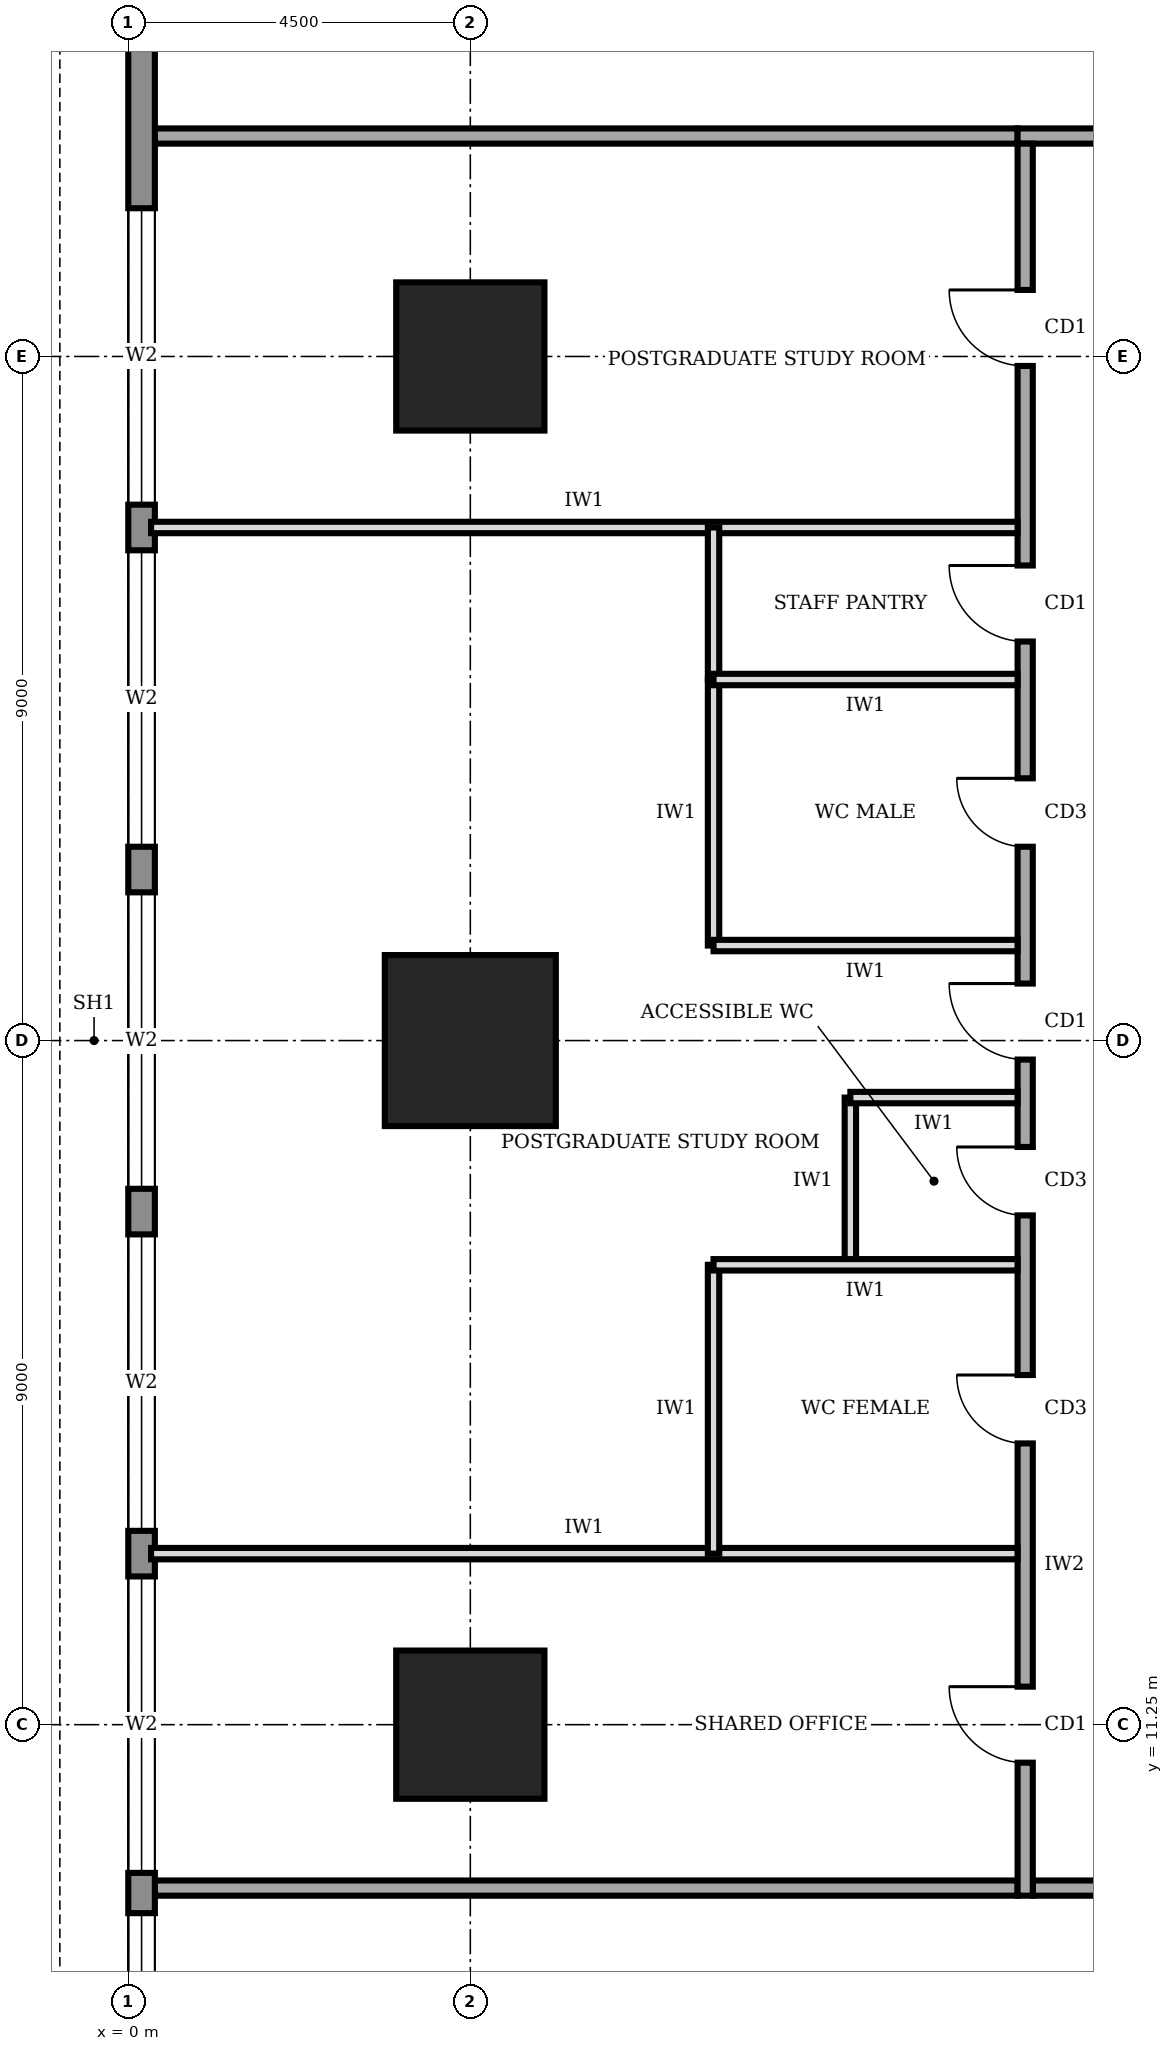
"""IFC4 building model, lengths in metres.
Left out: names, types, materials, properties, quantities, classifications, styles, units other than length and angle.
Written with IfcOpenShell. Run it as: python <this file> out.ifc"""

import sys

from ifc_helpers import new_model, si_unit, direction, frame, frame_2d, origin, origin_2d, place, context, subcontext, project, spatial, rectangle, extrude, element, fill, save


model = new_model("IFC4")
c1 = context("Model", 3, precision=1e-05, world=origin(), true_north=direction((0.0, 1.0)))
c2 = subcontext(c1, "Body", "Model", "MODEL_VIEW")
j1 = project(units=[si_unit("LENGTHUNIT", "METRE"), si_unit("PLANEANGLEUNIT", "RADIAN")], contexts=[c1])
p1 = place(None, origin())
s1 = spatial("IfcSite", under=j1, at=p1, CompositionType="ELEMENT")
p2 = place(p1, origin())
s2 = spatial("IfcBuilding", under=s1, at=p2, CompositionType="ELEMENT")
p3 = place(p2, frame((0.0, 0.0, 233.0)))
s3 = spatial("IfcBuildingStorey", under=s2, at=p3, CompositionType="ELEMENT", Elevation=233.0)
p4 = place(p3, frame((4.5, 11.25, 0.0), z_axis=(0.0, 0.0, 1.0), x_axis=(1.0, 0.0, 0.0)))
e1 = element("IfcColumn", 1, at=p4, inside=s3, PredefinedType="COLUMN", context=c2, shape_type="SweptSolid", body=[
    extrude(rectangle(XDim=1.95, YDim=1.95, at=origin_2d()), origin(), (0.0, 0.0, 1.0), 4.0),
])
p5 = place(p3, frame((4.5, 20.25, 0.0), z_axis=(0.0, 0.0, 1.0), x_axis=(1.0, 0.0, 0.0)))
e2 = element("IfcColumn", 2, at=p5, inside=s3, PredefinedType="COLUMN", context=c2, shape_type="SweptSolid", body=[
    extrude(rectangle(XDim=2.25, YDim=2.25, at=origin_2d()), origin(), (0.0, 0.0, 1.0), 4.0),
])
p6 = place(p3, frame((4.5, 29.25, 0.0), z_axis=(0.0, 0.0, 1.0), x_axis=(1.0, 0.0, 0.0)))
e3 = element("IfcColumn", 3, at=p6, inside=s3, PredefinedType="COLUMN", context=c2, shape_type="SweptSolid", body=[
    extrude(rectangle(XDim=1.95, YDim=1.95, at=origin_2d()), origin(), (0.0, 0.0, 1.0), 4.0),
])
p7 = place(p3, frame((0.175, 35.98, 0.0), z_axis=(0.0, 0.0, 1.0), x_axis=(0.0, -1.0, 0.0)))
e4 = element("IfcWall", 4, at=p7, inside=s3, PredefinedType="STANDARD", context=c2, shape_type="SweptSolid", body=[
    extrude(rectangle(XDim=31.46, YDim=0.35, at=frame_2d((15.73, 0.0))), origin(), (0.0, 0.0, 1.0), 3.75),
])
p8 = place(p7, frame((27.21, 0.0, 0.6)))
e5 = element("IfcOpeningElement", 5, at=p8, cuts=e4, PredefinedType="OPENING", context=c2, shape_type="SweptSolid", body=[
    extrude(rectangle(XDim=3.9, YDim=2.6, at=frame_2d((1.95, 1.3))), frame((0.0, 0.185, 0.0), z_axis=(0.0, -1.0, 0.0), x_axis=(1.0, 0.0, 0.0)), (0.0, 0.0, 1.0), 0.37),
])
p9 = place(p7, frame((22.78, 0.0, 0.6)))
e6 = element("IfcOpeningElement", 6, at=p9, cuts=e4, PredefinedType="OPENING", context=c2, shape_type="SweptSolid", body=[
    extrude(rectangle(XDim=3.9, YDim=2.6, at=frame_2d((1.95, 1.3))), frame((0.0, 0.185, 0.0), z_axis=(0.0, -1.0, 0.0), x_axis=(1.0, 0.0, 0.0)), (0.0, 0.0, 1.0), 0.37),
])
p10 = place(p7, frame((18.28, 0.0, 0.6)))
e7 = element("IfcOpeningElement", 7, at=p10, cuts=e4, PredefinedType="OPENING", context=c2, shape_type="SweptSolid", body=[
    extrude(rectangle(XDim=3.9, YDim=2.6, at=frame_2d((1.95, 1.3))), frame((0.0, 0.185, 0.0), z_axis=(0.0, -1.0, 0.0), x_axis=(1.0, 0.0, 0.0)), (0.0, 0.0, 1.0), 0.37),
])
p11 = place(p7, frame((13.78, 0.0, 0.6)))
e8 = element("IfcOpeningElement", 8, at=p11, cuts=e4, PredefinedType="OPENING", context=c2, shape_type="SweptSolid", body=[
    extrude(rectangle(XDim=3.9, YDim=2.6, at=frame_2d((1.95, 1.3))), frame((0.0, 0.185, 0.0), z_axis=(0.0, -1.0, 0.0), x_axis=(1.0, 0.0, 0.0)), (0.0, 0.0, 1.0), 0.37),
])
p12 = place(p7, frame((9.28, 0.0, 0.6)))
e9 = element("IfcOpeningElement", 9, at=p12, cuts=e4, PredefinedType="OPENING", context=c2, shape_type="SweptSolid", body=[
    extrude(rectangle(XDim=3.9, YDim=2.6, at=frame_2d((1.95, 1.3))), frame((0.0, 0.185, 0.0), z_axis=(0.0, -1.0, 0.0), x_axis=(1.0, 0.0, 0.0)), (0.0, 0.0, 1.0), 0.37),
])
p13 = place(p7, frame((4.78, 0.0, 0.6)))
e10 = element("IfcOpeningElement", 10, at=p13, cuts=e4, PredefinedType="OPENING", context=c2, shape_type="SweptSolid", body=[
    extrude(rectangle(XDim=3.9, YDim=2.6, at=frame_2d((1.95, 1.3))), frame((0.0, 0.185, 0.0), z_axis=(0.0, -1.0, 0.0), x_axis=(1.0, 0.0, 0.0)), (0.0, 0.0, 1.0), 0.37),
])
p14 = place(p3, frame((11.9, 9.1, 0.0), z_axis=(0.0, 0.0, 1.0), x_axis=(1.0, 0.0, 0.0)))
e11 = element("IfcWall", 11, at=p14, inside=s3, PredefinedType="SOLIDWALL", context=c2, shape_type="SweptSolid", body=[
    extrude(rectangle(XDim=16.9, YDim=0.2, at=frame_2d((8.45, 0.0))), origin(), (0.0, 0.0, 1.0), 3.75),
])
p15 = place(p3, frame((28.6, 32.15, 0.0), z_axis=(0.0, 0.0, 1.0), x_axis=(-1.0, 0.0, 0.0)))
e12 = element("IfcWall", 12, at=p15, inside=s3, PredefinedType="SOLIDWALL", context=c2, shape_type="SweptSolid", body=[
    extrude(rectangle(XDim=16.9, YDim=0.2, at=frame_2d((8.45, 0.0))), origin(), (0.0, 0.0, 1.0), 3.75),
])
p16 = place(p15, frame((12.85, 0.0, 0.0)))
e13 = element("IfcOpeningElement", 13, at=p16, cuts=e12, PredefinedType="OPENING", context=c2, shape_type="SweptSolid", body=[
    extrude(rectangle(XDim=1.8, YDim=2.1, at=frame_2d((0.9, 1.05))), frame((0.0, 0.11, 0.0), z_axis=(0.0, -1.0, 0.0), x_axis=(1.0, 0.0, 0.0)), (0.0, 0.0, 1.0), 0.22),
])
p17 = place(p15, frame((5.6, 0.0, 0.0)))
e14 = element("IfcOpeningElement", 14, at=p17, cuts=e12, PredefinedType="OPENING", context=c2, shape_type="SweptSolid", body=[
    extrude(rectangle(XDim=1.0, YDim=2.1, at=frame_2d((0.5, 1.05))), frame((0.0, 0.11, 0.0), z_axis=(0.0, -1.0, 0.0), x_axis=(1.0, 0.0, 0.0)), (0.0, 0.0, 1.0), 0.22),
])
p18 = place(p15, frame((0.275, 0.0, 0.0)))
e15 = element("IfcOpeningElement", 15, at=p18, cuts=e12, PredefinedType="OPENING", context=c2, shape_type="SweptSolid", body=[
    extrude(rectangle(XDim=1.0, YDim=2.1, at=frame_2d((0.5, 1.05))), frame((0.0, 0.11, 0.0), z_axis=(0.0, -1.0, 0.0), x_axis=(1.0, 0.0, 0.0)), (0.0, 0.0, 1.0), 0.22),
])
p19 = place(p3, frame((11.8, 32.05, 0.0), z_axis=(0.0, 0.0, 1.0), x_axis=(0.0, -1.0, 0.0)))
e16 = element("IfcWall", 16, at=p19, inside=s3, PredefinedType="SOLIDWALL", context=c2, shape_type="SweptSolid", body=[
    extrude(rectangle(XDim=23.05, YDim=0.2, at=frame_2d((11.525, 0.0))), origin(), (0.0, 0.0, 1.0), 3.75),
])
p20 = place(p19, frame((20.3, 0.0, 0.0)))
e17 = element("IfcOpeningElement", 17, at=p20, cuts=e16, PredefinedType="OPENING", context=c2, shape_type="SweptSolid", body=[
    extrude(rectangle(XDim=1.0, YDim=2.1, at=frame_2d((0.5, 1.05))), frame((0.0, 0.11, 0.0), z_axis=(0.0, -1.0, 0.0), x_axis=(1.0, 0.0, 0.0)), (0.0, 0.0, 1.0), 0.22),
])
p21 = place(p19, frame((16.2, 0.0, 0.0)))
e18 = element("IfcOpeningElement", 18, at=p21, cuts=e16, PredefinedType="OPENING", context=c2, shape_type="SweptSolid", body=[
    extrude(rectangle(XDim=0.9, YDim=2.1, at=frame_2d((0.45, 1.05))), frame((0.0, 0.11, 0.0), z_axis=(0.0, -1.0, 0.0), x_axis=(1.0, 0.0, 0.0)), (0.0, 0.0, 1.0), 0.22),
])
p22 = place(p19, frame((13.2, 0.0, 0.0)))
e19 = element("IfcOpeningElement", 19, at=p22, cuts=e16, PredefinedType="OPENING", context=c2, shape_type="SweptSolid", body=[
    extrude(rectangle(XDim=0.9, YDim=2.1, at=frame_2d((0.45, 1.05))), frame((0.0, 0.11, 0.0), z_axis=(0.0, -1.0, 0.0), x_axis=(1.0, 0.0, 0.0)), (0.0, 0.0, 1.0), 0.22),
])
p23 = place(p19, frame((8.35, 0.0, 0.0)))
e20 = element("IfcOpeningElement", 20, at=p23, cuts=e16, PredefinedType="OPENING", context=c2, shape_type="SweptSolid", body=[
    extrude(rectangle(XDim=0.9, YDim=2.1, at=frame_2d((0.45, 1.05))), frame((0.0, 0.11, 0.0), z_axis=(0.0, -1.0, 0.0), x_axis=(1.0, 0.0, 0.0)), (0.0, 0.0, 1.0), 0.22),
])
p24 = place(p19, frame((5.55, 0.0, 0.0)))
e21 = element("IfcOpeningElement", 21, at=p24, cuts=e16, PredefinedType="OPENING", context=c2, shape_type="SweptSolid", body=[
    extrude(rectangle(XDim=1.0, YDim=2.1, at=frame_2d((0.5, 1.05))), frame((0.0, 0.11, 0.0), z_axis=(0.0, -1.0, 0.0), x_axis=(1.0, 0.0, 0.0)), (0.0, 0.0, 1.0), 0.22),
])
p25 = place(p19, frame((11.05, 0.0, 0.0)))
e22 = element("IfcOpeningElement", 22, at=p25, cuts=e16, PredefinedType="OPENING", context=c2, shape_type="SweptSolid", body=[
    extrude(rectangle(XDim=1.0, YDim=2.1, at=frame_2d((0.5, 1.05))), frame((0.0, 0.11, 0.0), z_axis=(0.0, -1.0, 0.0), x_axis=(1.0, 0.0, 0.0)), (0.0, 0.0, 1.0), 0.22),
])
p26 = place(p19, frame((1.925, 0.0, 0.0)))
e23 = element("IfcOpeningElement", 23, at=p26, cuts=e16, PredefinedType="OPENING", context=c2, shape_type="SweptSolid", body=[
    extrude(rectangle(XDim=1.0, YDim=2.1, at=frame_2d((0.5, 1.05))), frame((0.0, 0.11, 0.0), z_axis=(0.0, -1.0, 0.0), x_axis=(1.0, 0.0, 0.0)), (0.0, 0.0, 1.0), 0.22),
])
for number, where, z_axis, x_axis in (
    (24, (0.3, 9.1, 0.0), (0.0, 0.0, 1.0), (1.0, 0.0, 0.0)),
    (25, (0.3, 32.15, 0.0), (0.0, 0.0, 1.0), (1.0, 0.0, 0.0)),
):
    element("IfcWall", number, at=place(p3, frame(where, z_axis=z_axis, x_axis=x_axis)), inside=s3, PredefinedType="SOLIDWALL", context=c2, shape_type="SweptSolid", body=[
        extrude(rectangle(XDim=11.4, YDim=0.2, at=frame_2d((5.7, 0.0))), origin(), (0.0, 0.0, 1.0), 3.75),
    ])
for number, where, z_axis, x_axis in (
    (26, (0.3, 13.5, 0.0), (0.0, 0.0, 1.0), (1.0, 0.0, 0.0)),
    (27, (0.3, 27.0, 0.0), (0.0, 0.0, 1.0), (1.0, 0.0, 0.0)),
):
    element("IfcWall", number, at=place(p3, frame(where, z_axis=z_axis, x_axis=x_axis)), inside=s3, PredefinedType="PARTITIONING", context=c2, shape_type="SweptSolid", body=[
        extrude(rectangle(XDim=11.4, YDim=0.15, at=frame_2d((5.7, 0.0))), origin(), (0.0, 0.0, 1.0), 3.75),
    ])
p27 = place(p3, frame((11.7, 17.3, 0.0), z_axis=(0.0, 0.0, 1.0), x_axis=(-1.0, 0.0, 0.0)))
e28 = element("IfcWall", 28, at=p27, inside=s3, PredefinedType="PARTITIONING", context=c2, shape_type="SweptSolid", body=[
    extrude(rectangle(XDim=4.0, YDim=0.15, at=frame_2d((2.0, 0.0))), origin(), (0.0, 0.0, 1.0), 3.75),
])
p28 = place(p3, frame((11.7, 19.5, 0.0), z_axis=(0.0, 0.0, 1.0), x_axis=(-1.0, 0.0, 0.0)))
e29 = element("IfcWall", 29, at=p28, inside=s3, PredefinedType="PARTITIONING", context=c2, shape_type="SweptSolid", body=[
    extrude(rectangle(XDim=2.2, YDim=0.15, at=frame_2d((1.1, 0.0))), origin(), (0.0, 0.0, 1.0), 2.85),
])
for number, where, z_axis, x_axis in (
    (30, (11.7, 21.5, 0.0), (0.0, 0.0, 1.0), (-1.0, 0.0, 0.0)),
    (31, (11.7, 25.0, 0.0), (0.0, 0.0, 1.0), (-1.0, 0.0, 0.0)),
):
    element("IfcWall", number, at=place(p3, frame(where, z_axis=z_axis, x_axis=x_axis)), inside=s3, PredefinedType="PARTITIONING", context=c2, shape_type="SweptSolid", body=[
        extrude(rectangle(XDim=4.0, YDim=0.15, at=frame_2d((2.0, 0.0))), origin(), (0.0, 0.0, 1.0), 3.75),
    ])
p29 = place(p3, frame((7.7, 13.5, 0.0), z_axis=(0.0, 0.0, 1.0), x_axis=(0.0, 1.0, 0.0)))
e32 = element("IfcWall", 32, at=p29, inside=s3, PredefinedType="PARTITIONING", context=c2, shape_type="SweptSolid", body=[
    extrude(rectangle(XDim=3.8, YDim=0.15, at=frame_2d((1.9, 0.0))), origin(), (0.0, 0.0, 1.0), 3.75),
])
p30 = place(p3, frame((9.5, 17.3, 0.0), z_axis=(0.0, 0.0, 1.0), x_axis=(0.0, 1.0, 0.0)))
e33 = element("IfcWall", 33, at=p30, inside=s3, PredefinedType="PARTITIONING", context=c2, shape_type="SweptSolid", body=[
    extrude(rectangle(XDim=2.2, YDim=0.15, at=frame_2d((1.1, 0.0))), origin(), (0.0, 0.0, 1.0), 3.75),
])
p31 = place(p3, frame((7.7, 21.5, 0.0), z_axis=(0.0, 0.0, 1.0), x_axis=(0.0, 1.0, 0.0)))
e34 = element("IfcWall", 34, at=p31, inside=s3, PredefinedType="PARTITIONING", context=c2, shape_type="SweptSolid", body=[
    extrude(rectangle(XDim=3.5, YDim=0.15, at=frame_2d((1.75, 0.0))), origin(), (0.0, 0.0, 1.0), 3.75),
])
p32 = place(p3, frame((7.7, 25.0, 0.0), z_axis=(0.0, 0.0, 1.0), x_axis=(0.0, 1.0, 0.0)))
e35 = element("IfcWall", 35, at=p32, inside=s3, PredefinedType="PARTITIONING", context=c2, shape_type="SweptSolid", body=[
    extrude(rectangle(XDim=2.0, YDim=0.15, at=frame_2d((1.0, 0.0))), origin(), (0.0, 0.0, 1.0), 3.75),
])
p33 = place(p8, origin())
e36 = element("IfcWindow", 36, at=p33, inside=s3, PartitioningType="SINGLE_PANEL", PredefinedType="WINDOW", context=c2, shape_type="SweptSolid", body=[
    extrude(rectangle(XDim=3.9, YDim=2.6, at=frame_2d((1.95, 1.3))), frame((0.0, 0.03, 0.0), z_axis=(0.0, -1.0, 0.0), x_axis=(1.0, 0.0, 0.0)), (0.0, 0.0, 1.0), 0.06),
])
fill(e5, e36)
p34 = place(p9, origin())
e37 = element("IfcWindow", 37, at=p34, inside=s3, PartitioningType="SINGLE_PANEL", PredefinedType="WINDOW", context=c2, shape_type="SweptSolid", body=[
    extrude(rectangle(XDim=3.9, YDim=2.6, at=frame_2d((1.95, 1.3))), frame((0.0, 0.03, 0.0), z_axis=(0.0, -1.0, 0.0), x_axis=(1.0, 0.0, 0.0)), (0.0, 0.0, 1.0), 0.06),
])
fill(e6, e37)
p35 = place(p10, origin())
e38 = element("IfcWindow", 38, at=p35, inside=s3, PartitioningType="SINGLE_PANEL", PredefinedType="WINDOW", context=c2, shape_type="SweptSolid", body=[
    extrude(rectangle(XDim=3.9, YDim=2.6, at=frame_2d((1.95, 1.3))), frame((0.0, 0.03, 0.0), z_axis=(0.0, -1.0, 0.0), x_axis=(1.0, 0.0, 0.0)), (0.0, 0.0, 1.0), 0.06),
])
fill(e7, e38)
p36 = place(p11, origin())
e39 = element("IfcWindow", 39, at=p36, inside=s3, PartitioningType="SINGLE_PANEL", PredefinedType="WINDOW", context=c2, shape_type="SweptSolid", body=[
    extrude(rectangle(XDim=3.9, YDim=2.6, at=frame_2d((1.95, 1.3))), frame((0.0, 0.03, 0.0), z_axis=(0.0, -1.0, 0.0), x_axis=(1.0, 0.0, 0.0)), (0.0, 0.0, 1.0), 0.06),
])
fill(e8, e39)
p37 = place(p12, origin())
e40 = element("IfcWindow", 40, at=p37, inside=s3, PartitioningType="SINGLE_PANEL", PredefinedType="WINDOW", context=c2, shape_type="SweptSolid", body=[
    extrude(rectangle(XDim=3.9, YDim=2.6, at=frame_2d((1.95, 1.3))), frame((0.0, 0.03, 0.0), z_axis=(0.0, -1.0, 0.0), x_axis=(1.0, 0.0, 0.0)), (0.0, 0.0, 1.0), 0.06),
])
fill(e9, e40)
p38 = place(p13, origin())
e41 = element("IfcWindow", 41, at=p38, inside=s3, PartitioningType="SINGLE_PANEL", PredefinedType="WINDOW", context=c2, shape_type="SweptSolid", body=[
    extrude(rectangle(XDim=3.9, YDim=2.6, at=frame_2d((1.95, 1.3))), frame((0.0, 0.03, 0.0), z_axis=(0.0, -1.0, 0.0), x_axis=(1.0, 0.0, 0.0)), (0.0, 0.0, 1.0), 0.06),
])
fill(e10, e41)
p39 = place(p20, frame((1.0, 0.0, 0.0), z_axis=(0.0, 0.0, 1.0), x_axis=(-1.0, 0.0, 0.0)))
e42 = element("IfcDoor", 42, at=p39, inside=s3, OperationType="SINGLE_SWING_RIGHT", PredefinedType="DOOR", context=c2, shape_type="SweptSolid", body=[
    extrude(rectangle(XDim=1.0, YDim=2.1, at=frame_2d((0.5, 1.05))), frame((0.0, 0.025, 0.0), z_axis=(0.0, -1.0, 0.0), x_axis=(1.0, 0.0, 0.0)), (0.0, 0.0, 1.0), 0.05),
])
fill(e17, e42)
p40 = place(p21, frame((0.9, 0.0, 0.0), z_axis=(0.0, 0.0, 1.0), x_axis=(-1.0, 0.0, 0.0)))
e43 = element("IfcDoor", 43, at=p40, inside=s3, OperationType="SINGLE_SWING_RIGHT", PredefinedType="DOOR", context=c2, shape_type="SweptSolid", body=[
    extrude(rectangle(XDim=0.9, YDim=2.1, at=frame_2d((0.45, 1.05))), frame((0.0, 0.025, 0.0), z_axis=(0.0, -1.0, 0.0), x_axis=(1.0, 0.0, 0.0)), (0.0, 0.0, 1.0), 0.05),
])
fill(e18, e43)
p41 = place(p22, frame((0.9, 0.0, 0.0), z_axis=(0.0, 0.0, 1.0), x_axis=(-1.0, 0.0, 0.0)))
e44 = element("IfcDoor", 44, at=p41, inside=s3, OperationType="SINGLE_SWING_RIGHT", PredefinedType="DOOR", context=c2, shape_type="SweptSolid", body=[
    extrude(rectangle(XDim=0.9, YDim=2.1, at=frame_2d((0.45, 1.05))), frame((0.0, 0.025, 0.0), z_axis=(0.0, -1.0, 0.0), x_axis=(1.0, 0.0, 0.0)), (0.0, 0.0, 1.0), 0.05),
])
fill(e19, e44)
p42 = place(p23, frame((0.9, 0.0, 0.0), z_axis=(0.0, 0.0, 1.0), x_axis=(-1.0, 0.0, 0.0)))
e45 = element("IfcDoor", 45, at=p42, inside=s3, OperationType="SINGLE_SWING_RIGHT", PredefinedType="DOOR", context=c2, shape_type="SweptSolid", body=[
    extrude(rectangle(XDim=0.9, YDim=2.1, at=frame_2d((0.45, 1.05))), frame((0.0, 0.025, 0.0), z_axis=(0.0, -1.0, 0.0), x_axis=(1.0, 0.0, 0.0)), (0.0, 0.0, 1.0), 0.05),
])
fill(e20, e45)
p43 = place(p24, frame((1.0, 0.0, 0.0), z_axis=(0.0, 0.0, 1.0), x_axis=(-1.0, 0.0, 0.0)))
e46 = element("IfcDoor", 46, at=p43, inside=s3, OperationType="SINGLE_SWING_RIGHT", PredefinedType="DOOR", context=c2, shape_type="SweptSolid", body=[
    extrude(rectangle(XDim=1.0, YDim=2.1, at=frame_2d((0.5, 1.05))), frame((0.0, 0.025, 0.0), z_axis=(0.0, -1.0, 0.0), x_axis=(1.0, 0.0, 0.0)), (0.0, 0.0, 1.0), 0.05),
])
fill(e21, e46)
p44 = place(p25, frame((1.0, 0.0, 0.0), z_axis=(0.0, 0.0, 1.0), x_axis=(-1.0, 0.0, 0.0)))
e47 = element("IfcDoor", 47, at=p44, inside=s3, OperationType="SINGLE_SWING_RIGHT", PredefinedType="DOOR", context=c2, shape_type="SweptSolid", body=[
    extrude(rectangle(XDim=1.0, YDim=2.1, at=frame_2d((0.5, 1.05))), frame((0.0, 0.025, 0.0), z_axis=(0.0, -1.0, 0.0), x_axis=(1.0, 0.0, 0.0)), (0.0, 0.0, 1.0), 0.05),
])
fill(e22, e47)
p45 = place(p26, frame((1.0, 0.0, 0.0), z_axis=(0.0, 0.0, 1.0), x_axis=(-1.0, 0.0, 0.0)))
e48 = element("IfcDoor", 48, at=p45, inside=s3, OperationType="SINGLE_SWING_RIGHT", PredefinedType="DOOR", context=c2, shape_type="SweptSolid", body=[
    extrude(rectangle(XDim=1.0, YDim=2.1, at=frame_2d((0.5, 1.05))), frame((0.0, 0.025, 0.0), z_axis=(0.0, -1.0, 0.0), x_axis=(1.0, 0.0, 0.0)), (0.0, 0.0, 1.0), 0.05),
])
fill(e23, e48)
save(model, sys.argv[1])
